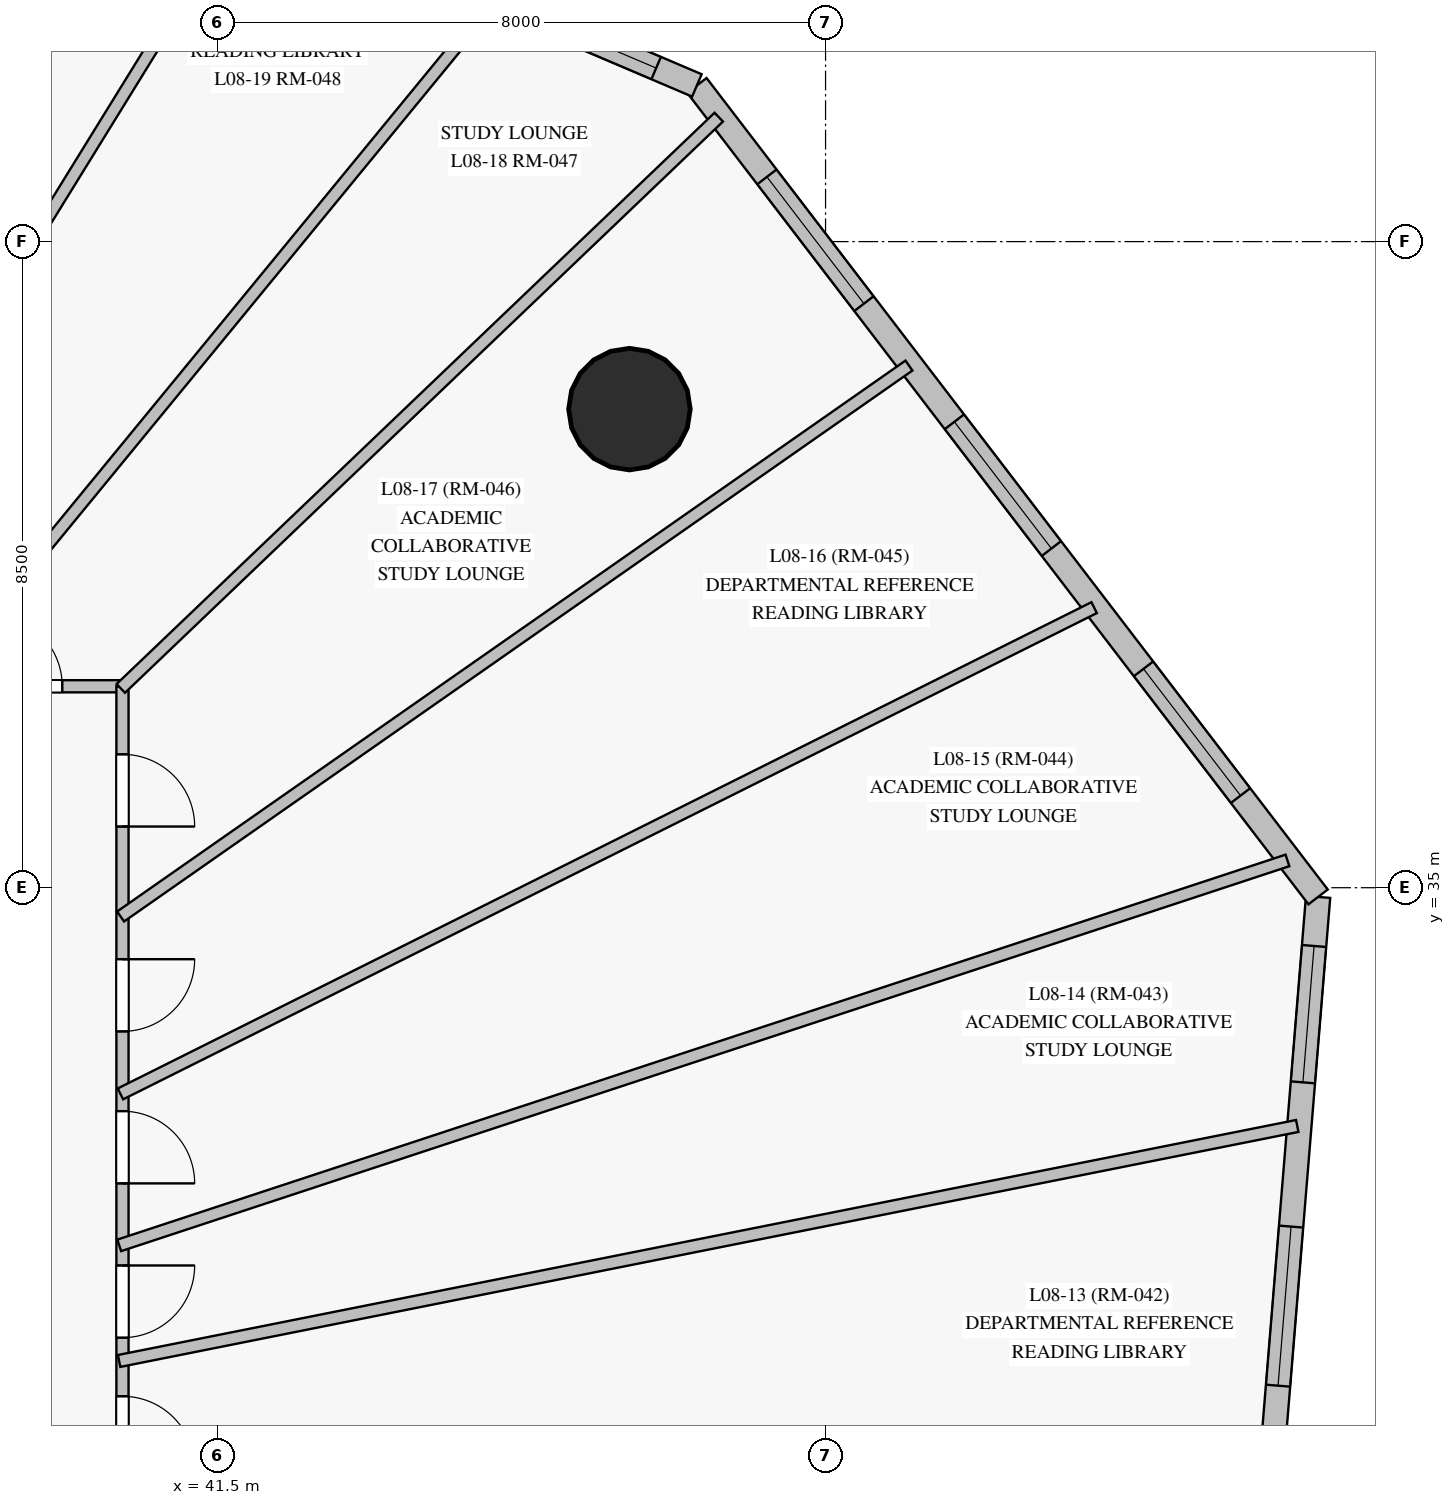
"""IFC4 building model, lengths in metres.
Left out: names, types, materials, properties, quantities, classifications, styles, units other than length and angle.
Written with IfcOpenShell. Run it as: python <this file> out.ifc"""

import sys

from ifc_helpers import new_model, si_unit, direction, frame, frame_2d, origin, origin_with_axes, origin_2d, place, context, subcontext, project, spatial, rectangle, circle, extrude, source, transform, mapped, element, fill, save


model = new_model("IFC4")
c1 = context("Model", 3, precision=1e-05, world=origin(), true_north=direction((0.0, 1.0)))
c2 = subcontext(c1, "Body", "Model", "MODEL_VIEW")
j1 = project(units=[si_unit("LENGTHUNIT", "METRE"), si_unit("PLANEANGLEUNIT", "RADIAN")], contexts=[c1])
p1 = place(None, origin())
s1 = spatial("IfcSite", under=j1, at=p1, CompositionType="ELEMENT")
p2 = place(p1, origin())
s2 = spatial("IfcBuilding", under=s1, at=p2, CompositionType="ELEMENT")
p3 = place(p2, frame((0.0, 0.0, 33.7)))
s3 = spatial("IfcBuildingStorey", under=s2, at=p3, CompositionType="ELEMENT", Elevation=33.7)
m1 = source(origin_with_axes(), c2, "Body", "SweptSolid", [
    extrude(circle(Radius=0.8, at=origin_2d()), origin(), (0.0, 0.0, 1.0), 3.6),
])
p4 = place(p3, frame((46.92, 41.296, 0.0), z_axis=(0.0, 0.0, 1.0), x_axis=(1.0, 0.0, 0.0)))
e1 = element("IfcColumn", 1, at=p4, inside=s3, PredefinedType="COLUMN", context=c2, shape_type="MappedRepresentation", body=[
    mapped(m1, transform((0.0, 0.0, 0.0), scale=1.0)),
])
p5 = place(p3, frame((55.097, 24.109, 0.0), z_axis=(0.0, 0.0, 1.0), x_axis=(0.081674843911, 0.996659028892, 0.0)))
e2 = element("IfcWall", 2, at=p5, inside=s3, PredefinedType="SOLIDWALL", context=c2, shape_type="SweptSolid", body=[
    extrude(rectangle(XDim=10.806, YDim=0.32, at=frame_2d((5.403, 0.0))), origin(), (0.0, 0.0, 1.0), 3.35),
])
p6 = place(p5, frame((0.649, 0.0, 0.85)))
e3 = element("IfcOpeningElement", 3, at=p6, cuts=e2, PredefinedType="OPENING", context=c2, shape_type="SweptSolid", body=[
    extrude(rectangle(XDim=1.8, YDim=1.85, at=frame_2d((0.9, 0.925))), frame((0.0, 0.17, 0.0), z_axis=(0.0, -1.0, 0.0), x_axis=(1.0, 0.0, 0.0)), (0.0, 0.0, 1.0), 0.34),
])
p7 = place(p5, frame((4.354, 0.0, 0.85)))
e4 = element("IfcOpeningElement", 4, at=p7, cuts=e2, PredefinedType="OPENING", context=c2, shape_type="SweptSolid", body=[
    extrude(rectangle(XDim=2.1, YDim=1.95, at=frame_2d((1.05, 0.975))), frame((0.0, 0.17, 0.0), z_axis=(0.0, -1.0, 0.0), x_axis=(1.0, 0.0, 0.0)), (0.0, 0.0, 1.0), 0.34),
])
p8 = place(p5, frame((8.358, 0.0, 0.85)))
e5 = element("IfcOpeningElement", 5, at=p8, cuts=e2, PredefinedType="OPENING", context=c2, shape_type="SweptSolid", body=[
    extrude(rectangle(XDim=1.8, YDim=1.85, at=frame_2d((0.9, 0.925))), frame((0.0, 0.17, 0.0), z_axis=(0.0, -1.0, 0.0), x_axis=(1.0, 0.0, 0.0)), (0.0, 0.0, 1.0), 0.34),
])
p9 = place(p3, frame((55.98, 34.879, 0.0), z_axis=(0.0, 0.0, 1.0), x_axis=(-0.607853082848, 0.794049513363, 0.0)))
e6 = element("IfcWall", 6, at=p9, inside=s3, PredefinedType="SOLIDWALL", context=c2, shape_type="SweptSolid", body=[
    extrude(rectangle(XDim=13.445, YDim=0.32, at=frame_2d((6.723, 0.0))), origin(), (0.0, 0.0, 1.0), 3.35),
])
p10 = place(p9, frame((1.679, 0.0, 0.85)))
e7 = element("IfcOpeningElement", 7, at=p10, cuts=e6, PredefinedType="OPENING", context=c2, shape_type="SweptSolid", body=[
    extrude(rectangle(XDim=2.1, YDim=1.95, at=frame_2d((1.05, 0.975))), frame((0.0, 0.17, 0.0), z_axis=(0.0, -1.0, 0.0), x_axis=(1.0, 0.0, 0.0)), (0.0, 0.0, 1.0), 0.34),
])
p11 = place(p9, frame((5.772, 0.0, 0.85)))
e8 = element("IfcOpeningElement", 8, at=p11, cuts=e6, PredefinedType="OPENING", context=c2, shape_type="SweptSolid", body=[
    extrude(rectangle(XDim=2.1, YDim=1.95, at=frame_2d((1.05, 0.975))), frame((0.0, 0.17, 0.0), z_axis=(0.0, -1.0, 0.0), x_axis=(1.0, 0.0, 0.0)), (0.0, 0.0, 1.0), 0.34),
])
p12 = place(p9, frame((9.83, 0.0, 0.85)))
e9 = element("IfcOpeningElement", 9, at=p12, cuts=e6, PredefinedType="OPENING", context=c2, shape_type="SweptSolid", body=[
    extrude(rectangle(XDim=2.1, YDim=1.95, at=frame_2d((1.05, 0.975))), frame((0.0, 0.17, 0.0), z_axis=(0.0, -1.0, 0.0), x_axis=(1.0, 0.0, 0.0)), (0.0, 0.0, 1.0), 0.34),
])
p13 = place(p3, frame((47.807, 45.555, 0.0), z_axis=(0.0, 0.0, 1.0), x_axis=(-0.919989506937, 0.391942989637, 0.0)))
e10 = element("IfcWall", 10, at=p13, inside=s3, PredefinedType="SOLIDWALL", context=c2, shape_type="SweptSolid", body=[
    extrude(rectangle(XDim=10.829, YDim=0.32, at=frame_2d((5.415, 0.0))), origin(), (0.0, 0.0, 1.0), 3.35),
])
p14 = place(p13, frame((0.583, 0.0, 0.85)))
e11 = element("IfcOpeningElement", 11, at=p14, cuts=e10, PredefinedType="OPENING", context=c2, shape_type="SweptSolid", body=[
    extrude(rectangle(XDim=1.8, YDim=1.85, at=frame_2d((0.9, 0.925))), frame((0.0, 0.17, 0.0), z_axis=(0.0, -1.0, 0.0), x_axis=(1.0, 0.0, 0.0)), (0.0, 0.0, 1.0), 0.34),
])
p15 = place(p13, frame((3.621, 0.0, 0.85)))
e12 = element("IfcOpeningElement", 12, at=p15, cuts=e10, PredefinedType="OPENING", context=c2, shape_type="SweptSolid", body=[
    extrude(rectangle(XDim=2.1, YDim=1.95, at=frame_2d((1.05, 0.975))), frame((0.0, 0.17, 0.0), z_axis=(0.0, -1.0, 0.0), x_axis=(1.0, 0.0, 0.0)), (0.0, 0.0, 1.0), 0.34),
])
p16 = place(p13, frame((7.405, 0.0, 0.85)))
e13 = element("IfcOpeningElement", 13, at=p16, cuts=e10, PredefinedType="OPENING", context=c2, shape_type="SweptSolid", body=[
    extrude(rectangle(XDim=2.1, YDim=1.95, at=frame_2d((1.05, 0.975))), frame((0.0, 0.17, 0.0), z_axis=(0.0, -1.0, 0.0), x_axis=(1.0, 0.0, 0.0)), (0.0, 0.0, 1.0), 0.34),
])
p17 = place(p3, frame((10.5, 37.65, 0.0), z_axis=(0.0, 0.0, 1.0), x_axis=(1.0, 0.0, 0.0)))
e14 = element("IfcWall", 14, at=p17, inside=s3, PredefinedType="PARTITIONING", context=c2, shape_type="SweptSolid", body=[
    extrude(rectangle(XDim=29.75, YDim=0.16, at=frame_2d((14.875, 0.0))), origin(), (0.0, 0.0, 1.0), 2.75),
])
p18 = place(p17, frame((28.008, 0.0, 0.0)))
e15 = element("IfcOpeningElement", 15, at=p18, cuts=e14, PredefinedType="OPENING", context=c2, shape_type="SweptSolid", body=[
    extrude(rectangle(XDim=0.95, YDim=2.15, at=frame_2d((0.475, 1.075))), frame((0.0, 0.09, 0.0), z_axis=(0.0, -1.0, 0.0), x_axis=(1.0, 0.0, 0.0)), (0.0, 0.0, 1.0), 0.18),
])
p19 = place(p17, frame((25.599, 0.0, 0.0)))
e16 = element("IfcOpeningElement", 16, at=p19, cuts=e14, PredefinedType="OPENING", context=c2, shape_type="SweptSolid", body=[
    extrude(rectangle(XDim=0.95, YDim=2.15, at=frame_2d((0.475, 1.075))), frame((0.0, 0.09, 0.0), z_axis=(0.0, -1.0, 0.0), x_axis=(1.0, 0.0, 0.0)), (0.0, 0.0, 1.0), 0.18),
])
p20 = place(p17, frame((23.319, 0.0, 0.0)))
e17 = element("IfcOpeningElement", 17, at=p20, cuts=e14, PredefinedType="OPENING", context=c2, shape_type="SweptSolid", body=[
    extrude(rectangle(XDim=0.95, YDim=2.15, at=frame_2d((0.475, 1.075))), frame((0.0, 0.09, 0.0), z_axis=(0.0, -1.0, 0.0), x_axis=(1.0, 0.0, 0.0)), (0.0, 0.0, 1.0), 0.18),
])
p21 = place(p17, frame((20.597, 0.0, 0.0)))
e18 = element("IfcOpeningElement", 18, at=p21, cuts=e14, PredefinedType="OPENING", context=c2, shape_type="SweptSolid", body=[
    extrude(rectangle(XDim=0.95, YDim=2.15, at=frame_2d((0.475, 1.075))), frame((0.0, 0.09, 0.0), z_axis=(0.0, -1.0, 0.0), x_axis=(1.0, 0.0, 0.0)), (0.0, 0.0, 1.0), 0.18),
])
p22 = place(p17, frame((18.611, 0.0, 0.0)))
e19 = element("IfcOpeningElement", 19, at=p22, cuts=e14, PredefinedType="OPENING", context=c2, shape_type="SweptSolid", body=[
    extrude(rectangle(XDim=0.95, YDim=2.15, at=frame_2d((0.475, 1.075))), frame((0.0, 0.09, 0.0), z_axis=(0.0, -1.0, 0.0), x_axis=(1.0, 0.0, 0.0)), (0.0, 0.0, 1.0), 0.18),
])
p23 = place(p17, frame((16.123, 0.0, 0.0)))
e20 = element("IfcOpeningElement", 20, at=p23, cuts=e14, PredefinedType="OPENING", context=c2, shape_type="SweptSolid", body=[
    extrude(rectangle(XDim=0.95, YDim=2.15, at=frame_2d((0.475, 1.075))), frame((0.0, 0.09, 0.0), z_axis=(0.0, -1.0, 0.0), x_axis=(1.0, 0.0, 0.0)), (0.0, 0.0, 1.0), 0.18),
])
p24 = place(p17, frame((12.996, 0.0, 0.0)))
e21 = element("IfcOpeningElement", 21, at=p24, cuts=e14, PredefinedType="OPENING", context=c2, shape_type="SweptSolid", body=[
    extrude(rectangle(XDim=0.95, YDim=2.15, at=frame_2d((0.475, 1.075))), frame((0.0, 0.09, 0.0), z_axis=(0.0, -1.0, 0.0), x_axis=(1.0, 0.0, 0.0)), (0.0, 0.0, 1.0), 0.18),
])
p25 = place(p17, frame((10.46, 0.0, 0.0)))
e22 = element("IfcOpeningElement", 22, at=p25, cuts=e14, PredefinedType="OPENING", context=c2, shape_type="SweptSolid", body=[
    extrude(rectangle(XDim=0.95, YDim=2.15, at=frame_2d((0.475, 1.075))), frame((0.0, 0.09, 0.0), z_axis=(0.0, -1.0, 0.0), x_axis=(1.0, 0.0, 0.0)), (0.0, 0.0, 1.0), 0.18),
])
p26 = place(p17, frame((7.876, 0.0, 0.0)))
e23 = element("IfcOpeningElement", 23, at=p26, cuts=e14, PredefinedType="OPENING", context=c2, shape_type="SweptSolid", body=[
    extrude(rectangle(XDim=0.95, YDim=2.15, at=frame_2d((0.475, 1.075))), frame((0.0, 0.09, 0.0), z_axis=(0.0, -1.0, 0.0), x_axis=(1.0, 0.0, 0.0)), (0.0, 0.0, 1.0), 0.18),
])
p27 = place(p17, frame((6.748, 0.0, 0.0)))
e24 = element("IfcOpeningElement", 24, at=p27, cuts=e14, PredefinedType="OPENING", context=c2, shape_type="SweptSolid", body=[
    extrude(rectangle(XDim=0.95, YDim=2.15, at=frame_2d((0.475, 1.075))), frame((0.0, 0.09, 0.0), z_axis=(0.0, -1.0, 0.0), x_axis=(1.0, 0.0, 0.0)), (0.0, 0.0, 1.0), 0.18),
])
p28 = place(p17, frame((5.623, 0.0, 0.0)))
e25 = element("IfcOpeningElement", 25, at=p28, cuts=e14, PredefinedType="OPENING", context=c2, shape_type="SweptSolid", body=[
    extrude(rectangle(XDim=0.95, YDim=2.15, at=frame_2d((0.475, 1.075))), frame((0.0, 0.09, 0.0), z_axis=(0.0, -1.0, 0.0), x_axis=(1.0, 0.0, 0.0)), (0.0, 0.0, 1.0), 0.18),
])
p29 = place(p3, frame((40.25, 37.65, 0.0), z_axis=(0.0, 0.0, 1.0), x_axis=(0.0, -1.0, 0.0)))
e26 = element("IfcWall", 26, at=p29, inside=s3, PredefinedType="PARTITIONING", context=c2, shape_type="SweptSolid", body=[
    extrude(rectangle(XDim=22.3, YDim=0.16, at=frame_2d((11.15, 0.0))), origin(), (0.0, 0.0, 1.0), 2.75),
])
p30 = place(p29, frame((16.25, 0.0, 0.0)))
e27 = element("IfcOpeningElement", 27, at=p30, cuts=e26, PredefinedType="OPENING", context=c2, shape_type="SweptSolid", body=[
    extrude(rectangle(XDim=0.95, YDim=2.15, at=frame_2d((0.475, 1.075))), frame((0.0, 0.09, 0.0), z_axis=(0.0, -1.0, 0.0), x_axis=(1.0, 0.0, 0.0)), (0.0, 0.0, 1.0), 0.18),
])
p31 = place(p29, frame((14.02, 0.0, 0.0)))
e28 = element("IfcOpeningElement", 28, at=p31, cuts=e26, PredefinedType="OPENING", context=c2, shape_type="SweptSolid", body=[
    extrude(rectangle(XDim=0.95, YDim=2.15, at=frame_2d((0.475, 1.075))), frame((0.0, 0.09, 0.0), z_axis=(0.0, -1.0, 0.0), x_axis=(1.0, 0.0, 0.0)), (0.0, 0.0, 1.0), 0.18),
])
p32 = place(p29, frame((11.165, 0.0, 0.0)))
e29 = element("IfcOpeningElement", 29, at=p32, cuts=e26, PredefinedType="OPENING", context=c2, shape_type="SweptSolid", body=[
    extrude(rectangle(XDim=0.95, YDim=2.15, at=frame_2d((0.475, 1.075))), frame((0.0, 0.09, 0.0), z_axis=(0.0, -1.0, 0.0), x_axis=(1.0, 0.0, 0.0)), (0.0, 0.0, 1.0), 0.18),
])
p33 = place(p29, frame((9.341, 0.0, 0.0)))
e30 = element("IfcOpeningElement", 30, at=p33, cuts=e26, PredefinedType="OPENING", context=c2, shape_type="SweptSolid", body=[
    extrude(rectangle(XDim=0.95, YDim=2.15, at=frame_2d((0.475, 1.075))), frame((0.0, 0.09, 0.0), z_axis=(0.0, -1.0, 0.0), x_axis=(1.0, 0.0, 0.0)), (0.0, 0.0, 1.0), 0.18),
])
p34 = place(p29, frame((7.62, 0.0, 0.0)))
e31 = element("IfcOpeningElement", 31, at=p34, cuts=e26, PredefinedType="OPENING", context=c2, shape_type="SweptSolid", body=[
    extrude(rectangle(XDim=0.95, YDim=2.15, at=frame_2d((0.475, 1.075))), frame((0.0, 0.09, 0.0), z_axis=(0.0, -1.0, 0.0), x_axis=(1.0, 0.0, 0.0)), (0.0, 0.0, 1.0), 0.18),
])
p35 = place(p29, frame((5.59, 0.0, 0.0)))
e32 = element("IfcOpeningElement", 32, at=p35, cuts=e26, PredefinedType="OPENING", context=c2, shape_type="SweptSolid", body=[
    extrude(rectangle(XDim=0.95, YDim=2.15, at=frame_2d((0.475, 1.075))), frame((0.0, 0.09, 0.0), z_axis=(0.0, -1.0, 0.0), x_axis=(1.0, 0.0, 0.0)), (0.0, 0.0, 1.0), 0.18),
])
p36 = place(p29, frame((3.591, 0.0, 0.0)))
e33 = element("IfcOpeningElement", 33, at=p36, cuts=e26, PredefinedType="OPENING", context=c2, shape_type="SweptSolid", body=[
    extrude(rectangle(XDim=0.95, YDim=2.15, at=frame_2d((0.475, 1.075))), frame((0.0, 0.09, 0.0), z_axis=(0.0, -1.0, 0.0), x_axis=(1.0, 0.0, 0.0)), (0.0, 0.0, 1.0), 0.18),
])
p37 = place(p29, frame((0.895, 0.0, 0.0)))
e34 = element("IfcOpeningElement", 34, at=p37, cuts=e26, PredefinedType="OPENING", context=c2, shape_type="SweptSolid", body=[
    extrude(rectangle(XDim=0.95, YDim=2.15, at=frame_2d((0.475, 1.075))), frame((0.0, 0.09, 0.0), z_axis=(0.0, -1.0, 0.0), x_axis=(1.0, 0.0, 0.0)), (0.0, 0.0, 1.0), 0.18),
])
p38 = place(p3, frame((40.207, 30.294, 0.0), z_axis=(0.0, 0.0, 1.0), x_axis=(0.949765450766, 0.312962599252, 0.0)))
e35 = element("IfcWall", 35, at=p38, inside=s3, PredefinedType="PARTITIONING", context=c2, shape_type="SweptSolid", body=[
    extrude(rectangle(XDim=16.182, YDim=0.16, at=frame_2d((8.091, 0.0))), origin(), (0.0, 0.0, 1.0), 3.35),
])
p39 = place(p3, frame((40.206, 28.774, 0.0), z_axis=(0.0, 0.0, 1.0), x_axis=(0.980679767077, 0.195620025679, 0.0)))
e36 = element("IfcWall", 36, at=p39, inside=s3, PredefinedType="PARTITIONING", context=c2, shape_type="SweptSolid", body=[
    extrude(rectangle(XDim=15.805, YDim=0.16, at=frame_2d((7.903, 0.0))), origin(), (0.0, 0.0, 1.0), 3.35),
])
p40 = place(p3, frame((40.223, 32.287, 0.0), z_axis=(0.0, 0.0, 1.0), x_axis=(0.894645323944, 0.44677706336, 0.0)))
e37 = element("IfcWall", 37, at=p40, inside=s3, PredefinedType="PARTITIONING", context=c2, shape_type="SweptSolid", body=[
    extrude(rectangle(XDim=14.319, YDim=0.16, at=frame_2d((7.16, 0.0))), origin(), (0.0, 0.0, 1.0), 3.35),
])
p41 = place(p3, frame((40.225, 34.621, 0.0), z_axis=(0.0, 0.0, 1.0), x_axis=(0.819692125895, 0.572804345956, 0.0)))
e38 = element("IfcWall", 38, at=p41, inside=s3, PredefinedType="PARTITIONING", context=c2, shape_type="SweptSolid", body=[
    extrude(rectangle(XDim=12.654, YDim=0.16, at=frame_2d((6.327, 0.0))), origin(), (0.0, 0.0, 1.0), 3.35),
])
p42 = place(p3, frame((35.44, 37.625, 0.0), z_axis=(0.0, 0.0, 1.0), x_axis=(0.525421629301, 0.850842001468, 0.0)))
e39 = element("IfcWall", 39, at=p42, inside=s3, PredefinedType="PARTITIONING", context=c2, shape_type="SweptSolid", body=[
    extrude(rectangle(XDim=12.256, YDim=0.16, at=frame_2d((6.128, 0.0))), origin(), (0.0, 0.0, 1.0), 3.35),
])
p43 = place(p3, frame((37.713, 37.627, 0.0), z_axis=(0.0, 0.0, 1.0), x_axis=(0.634544387192, 0.772886421593, 0.0)))
e40 = element("IfcWall", 40, at=p43, inside=s3, PredefinedType="PARTITIONING", context=c2, shape_type="SweptSolid", body=[
    extrude(rectangle(XDim=11.693, YDim=0.16, at=frame_2d((5.847, 0.0))), origin(), (0.0, 0.0, 1.0), 3.35),
])
p44 = place(p3, frame((40.228, 37.622, 0.0), z_axis=(0.0, 0.0, 1.0), x_axis=(0.723068149903, 0.690776700964, 0.0)))
e41 = element("IfcWall", 41, at=p44, inside=s3, PredefinedType="PARTITIONING", context=c2, shape_type="SweptSolid", body=[
    extrude(rectangle(XDim=10.88, YDim=0.16, at=frame_2d((5.44, 0.0))), origin(), (0.0, 0.0, 1.0), 3.35),
])
m2 = source(origin_with_axes(), c2, "Body", "SweptSolid", [
    extrude(rectangle(XDim=2.1, YDim=1.95, at=frame_2d((1.05, 0.975))), frame((0.0, 0.03, 0.0), z_axis=(0.0, -1.0, 0.0), x_axis=(1.0, 0.0, 0.0)), (0.0, 0.0, 1.0), 0.06),
])
p45 = place(p7, origin())
e42 = element("IfcWindow", 42, at=p45, inside=s3, PartitioningType="SINGLE_PANEL", PredefinedType="WINDOW", context=c2, shape_type="MappedRepresentation", body=[
    mapped(m2, transform((0.0, 0.0, 0.0), scale=1.0)),
])
fill(e4, e42)
m3 = source(origin_with_axes(), c2, "Body", "SweptSolid", [
    extrude(rectangle(XDim=1.8, YDim=1.85, at=frame_2d((0.9, 0.925))), frame((0.0, 0.03, 0.0), z_axis=(0.0, -1.0, 0.0), x_axis=(1.0, 0.0, 0.0)), (0.0, 0.0, 1.0), 0.06),
])
p46 = place(p8, origin())
e43 = element("IfcWindow", 43, at=p46, inside=s3, PartitioningType="SINGLE_PANEL", PredefinedType="WINDOW", context=c2, shape_type="MappedRepresentation", body=[
    mapped(m3, transform((0.0, 0.0, 0.0), scale=1.0)),
])
fill(e5, e43)
p47 = place(p10, origin())
e44 = element("IfcWindow", 44, at=p47, inside=s3, PartitioningType="SINGLE_PANEL", PredefinedType="WINDOW", context=c2, shape_type="MappedRepresentation", body=[
    mapped(m2, transform((0.0, 0.0, 0.0), scale=1.0)),
])
fill(e7, e44)
p48 = place(p11, origin())
e45 = element("IfcWindow", 45, at=p48, inside=s3, PartitioningType="SINGLE_PANEL", PredefinedType="WINDOW", context=c2, shape_type="MappedRepresentation", body=[
    mapped(m2, transform((0.0, 0.0, 0.0), scale=1.0)),
])
fill(e8, e45)
p49 = place(p12, origin())
e46 = element("IfcWindow", 46, at=p49, inside=s3, PartitioningType="SINGLE_PANEL", PredefinedType="WINDOW", context=c2, shape_type="MappedRepresentation", body=[
    mapped(m2, transform((0.0, 0.0, 0.0), scale=1.0)),
])
fill(e9, e46)
p50 = place(p14, origin())
e47 = element("IfcWindow", 47, at=p50, inside=s3, PartitioningType="SINGLE_PANEL", PredefinedType="WINDOW", context=c2, shape_type="MappedRepresentation", body=[
    mapped(m3, transform((0.0, 0.0, 0.0), scale=1.0)),
])
fill(e11, e47)
m4 = source(origin_with_axes(), c2, "Body", "SweptSolid", [
    extrude(rectangle(XDim=0.95, YDim=2.15, at=frame_2d((0.475, 1.075))), frame((0.0, 0.025, 0.0), z_axis=(0.0, -1.0, 0.0), x_axis=(1.0, 0.0, 0.0)), (0.0, 0.0, 1.0), 0.05),
])
p51 = place(p33, origin())
e48 = element("IfcDoor", 48, at=p51, inside=s3, OperationType="SINGLE_SWING_RIGHT", PredefinedType="DOOR", context=c2, shape_type="MappedRepresentation", body=[
    mapped(m4, transform((0.0, 0.0, 0.0), scale=1.0)),
])
fill(e30, e48)
p52 = place(p34, origin())
e49 = element("IfcDoor", 49, at=p52, inside=s3, OperationType="SINGLE_SWING_LEFT", PredefinedType="DOOR", context=c2, shape_type="MappedRepresentation", body=[
    mapped(m4, transform((0.0, 0.0, 0.0), scale=1.0)),
])
fill(e31, e49)
p53 = place(p35, origin())
e50 = element("IfcDoor", 50, at=p53, inside=s3, OperationType="SINGLE_SWING_RIGHT", PredefinedType="DOOR", context=c2, shape_type="MappedRepresentation", body=[
    mapped(m4, transform((0.0, 0.0, 0.0), scale=1.0)),
])
fill(e32, e50)
p54 = place(p36, origin())
e51 = element("IfcDoor", 51, at=p54, inside=s3, OperationType="SINGLE_SWING_LEFT", PredefinedType="DOOR", context=c2, shape_type="MappedRepresentation", body=[
    mapped(m4, transform((0.0, 0.0, 0.0), scale=1.0)),
])
fill(e33, e51)
p55 = place(p37, origin())
e52 = element("IfcDoor", 52, at=p55, inside=s3, OperationType="SINGLE_SWING_RIGHT", PredefinedType="DOOR", context=c2, shape_type="MappedRepresentation", body=[
    mapped(m4, transform((0.0, 0.0, 0.0), scale=1.0)),
])
fill(e34, e52)
p56 = place(p18, origin())
e53 = element("IfcDoor", 53, at=p56, inside=s3, OperationType="SINGLE_SWING_LEFT", PredefinedType="DOOR", context=c2, shape_type="MappedRepresentation", body=[
    mapped(m4, transform((0.0, 0.0, 0.0), scale=1.0)),
])
fill(e15, e53)
save(model, sys.argv[1])
